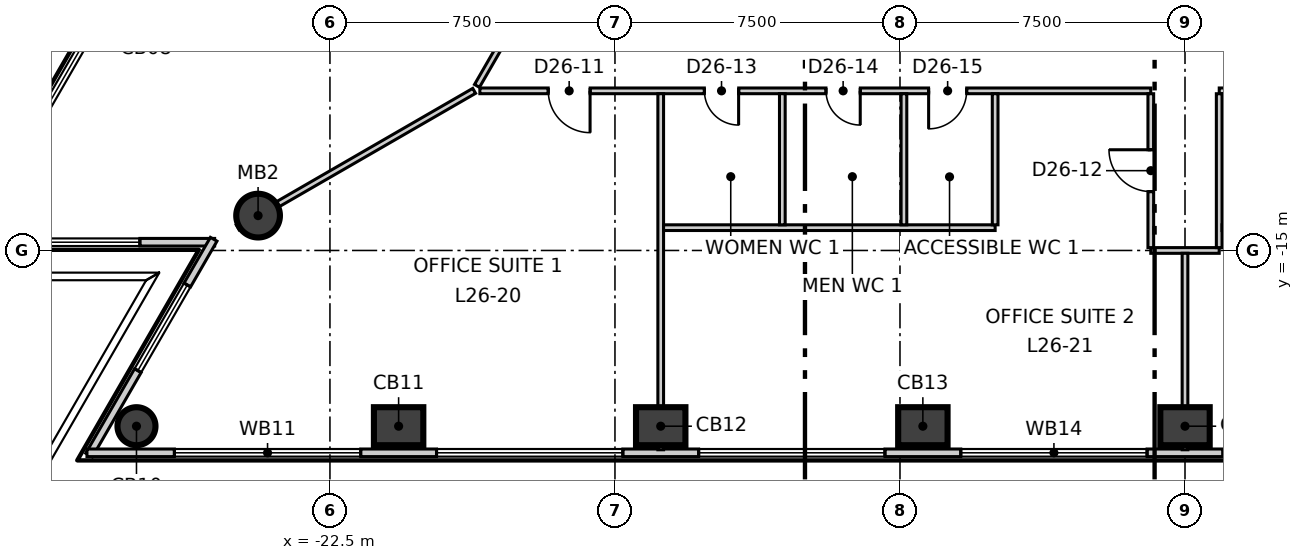
"""IFC4 building model, lengths in metres.
Left out: names, types, materials, properties, quantities, classifications, styles, units other than length and angle.
Written with IfcOpenShell. Run it as: python <this file> out.ifc"""

import sys

from ifc_helpers import new_model, si_unit, direction, frame, frame_2d, origin, origin_2d, place, context, subcontext, project, spatial, rectangle, circle, extrude, element, fill, save


model = new_model("IFC4")
c1 = context("Model", 3, precision=1e-05, world=origin(), true_north=direction((0.0, 1.0)))
c2 = subcontext(c1, "Body", "Model", "MODEL_VIEW")
j1 = project(units=[si_unit("LENGTHUNIT", "METRE"), si_unit("PLANEANGLEUNIT", "RADIAN")], contexts=[c1])
p1 = place(None, origin())
s1 = spatial("IfcSite", under=j1, at=p1, CompositionType="ELEMENT")
p2 = place(p1, origin())
s2 = spatial("IfcBuilding", under=s1, at=p2, CompositionType="ELEMENT")
p3 = place(p2, frame((0.0, 0.0, 116.3)))
s3 = spatial("IfcBuildingStorey", under=s2, at=p3, CompositionType="ELEMENT", Elevation=116.3)
p4 = place(p3, frame((-27.591, -19.624, -0.3), z_axis=(0.0, 0.0, 1.0), x_axis=(1.0, 0.0, 0.0)))
e1 = element("IfcColumn", 1, at=p4, inside=s3, PredefinedType="COLUMN", context=c2, shape_type="SweptSolid", body=[
    extrude(circle(Radius=0.5, at=origin_2d()), origin(), (0.0, 0.0, 1.0), 4.0),
])
for number, where, z_axis, x_axis in (
    (2, (-20.693, -19.624, -0.3), (0.0, 0.0, 1.0), (1.0, 0.0, 0.0)),
    (3, (-13.796, -19.624, -0.3), (0.0, 0.0, 1.0), (1.0, 0.0, 0.0)),
    (4, (-6.898, -19.624, -0.3), (0.0, 0.0, 1.0), (1.0, 0.0, 0.0)),
    (5, (0.0, -19.624, -0.3), (0.0, 0.0, 1.0), (1.0, 0.0, 0.0)),
):
    element("IfcColumn", number, at=place(p3, frame(where, z_axis=z_axis, x_axis=x_axis)), inside=s3, PredefinedType="COLUMN", context=c2, shape_type="SweptSolid", body=[
        extrude(rectangle(XDim=1.3, YDim=1.0, at=origin_2d()), origin(), (0.0, 0.0, 1.0), 4.0),
    ])
p5 = place(p3, frame((-24.391, -14.083, -0.3), z_axis=(0.0, 0.0, 1.0), x_axis=(1.0, 0.0, 0.0)))
e6 = element("IfcColumn", 6, at=p5, inside=s3, PredefinedType="COLUMN", context=c2, shape_type="SweptSolid", body=[
    extrude(circle(Radius=0.575, at=origin_2d()), origin(), (0.0, 0.0, 1.0), 4.0),
])
p6 = place(p3, frame((-3.154, 35.185, 0.0), z_axis=(0.0, 0.0, 1.0), x_axis=(-0.499996704161, -0.866027306629, 0.0)))
e7 = element("IfcWall", 7, at=p6, inside=s3, PredefinedType="ELEMENTEDWALL", context=c2, shape_type="SweptSolid", body=[
    extrude(rectangle(XDim=57.769, YDim=0.2, at=frame_2d((28.884, 0.0))), origin(), (0.0, 0.0, 1.0), 3.7),
])
p7 = place(p6, frame((2.301, 0.0, 0.9)))
e8 = element("IfcOpeningElement", 8, at=p7, cuts=e7, PredefinedType="OPENING", context=c2, shape_type="SweptSolid", body=[
    extrude(rectangle(XDim=4.9, YDim=2.5, at=frame_2d((2.45, 1.25))), frame((0.0, 0.11, 0.0), z_axis=(0.0, -1.0, 0.0), x_axis=(1.0, 0.0, 0.0)), (0.0, 0.0, 1.0), 0.22),
])
p8 = place(p6, frame((9.199, 0.0, 0.9)))
e9 = element("IfcOpeningElement", 9, at=p8, cuts=e7, PredefinedType="OPENING", context=c2, shape_type="SweptSolid", body=[
    extrude(rectangle(XDim=4.9, YDim=2.5, at=frame_2d((2.45, 1.25))), frame((0.0, 0.11, 0.0), z_axis=(0.0, -1.0, 0.0), x_axis=(1.0, 0.0, 0.0)), (0.0, 0.0, 1.0), 0.22),
])
p9 = place(p6, frame((16.097, 0.0, 0.9)))
e10 = element("IfcOpeningElement", 10, at=p9, cuts=e7, PredefinedType="OPENING", context=c2, shape_type="SweptSolid", body=[
    extrude(rectangle(XDim=4.9, YDim=2.5, at=frame_2d((2.45, 1.25))), frame((0.0, 0.11, 0.0), z_axis=(0.0, -1.0, 0.0), x_axis=(1.0, 0.0, 0.0)), (0.0, 0.0, 1.0), 0.22),
])
p10 = place(p6, frame((22.995, 0.0, 0.9)))
e11 = element("IfcOpeningElement", 11, at=p10, cuts=e7, PredefinedType="OPENING", context=c2, shape_type="SweptSolid", body=[
    extrude(rectangle(XDim=4.9, YDim=2.5, at=frame_2d((2.45, 1.25))), frame((0.0, 0.11, 0.0), z_axis=(0.0, -1.0, 0.0), x_axis=(1.0, 0.0, 0.0)), (0.0, 0.0, 1.0), 0.22),
])
p11 = place(p6, frame((29.893, 0.0, 0.9)))
e12 = element("IfcOpeningElement", 12, at=p11, cuts=e7, PredefinedType="OPENING", context=c2, shape_type="SweptSolid", body=[
    extrude(rectangle(XDim=4.9, YDim=2.5, at=frame_2d((2.45, 1.25))), frame((0.0, 0.11, 0.0), z_axis=(0.0, -1.0, 0.0), x_axis=(1.0, 0.0, 0.0)), (0.0, 0.0, 1.0), 0.22),
])
p12 = place(p6, frame((36.791, 0.0, 0.9)))
e13 = element("IfcOpeningElement", 13, at=p12, cuts=e7, PredefinedType="OPENING", context=c2, shape_type="SweptSolid", body=[
    extrude(rectangle(XDim=4.9, YDim=2.5, at=frame_2d((2.45, 1.25))), frame((0.0, 0.11, 0.0), z_axis=(0.0, -1.0, 0.0), x_axis=(1.0, 0.0, 0.0)), (0.0, 0.0, 1.0), 0.22),
])
p13 = place(p6, frame((43.689, 0.0, 0.9)))
e14 = element("IfcOpeningElement", 14, at=p13, cuts=e7, PredefinedType="OPENING", context=c2, shape_type="SweptSolid", body=[
    extrude(rectangle(XDim=4.9, YDim=2.5, at=frame_2d((2.45, 1.25))), frame((0.0, 0.11, 0.0), z_axis=(0.0, -1.0, 0.0), x_axis=(1.0, 0.0, 0.0)), (0.0, 0.0, 1.0), 0.22),
])
p14 = place(p6, frame((50.586, 0.0, 0.9)))
e15 = element("IfcOpeningElement", 15, at=p14, cuts=e7, PredefinedType="OPENING", context=c2, shape_type="SweptSolid", body=[
    extrude(rectangle(XDim=4.9, YDim=2.5, at=frame_2d((2.45, 1.25))), frame((0.0, 0.11, 0.0), z_axis=(0.0, -1.0, 0.0), x_axis=(1.0, 0.0, 0.0)), (0.0, 0.0, 1.0), 0.22),
])
p15 = place(p3, frame((-32.093, -14.783, 0.0), z_axis=(0.0, 0.0, 1.0), x_axis=(1.0, 0.0, 0.0)))
e16 = element("IfcWall", 16, at=p15, inside=s3, PredefinedType="ELEMENTEDWALL", context=c2, shape_type="SweptSolid", body=[
    extrude(rectangle(XDim=6.559, YDim=0.2, at=frame_2d((3.28, 0.0))), origin(), (0.0, 0.0, 1.0), 3.7),
])
p16 = place(p15, frame((1.99, 0.0, 0.9)))
e17 = element("IfcOpeningElement", 17, at=p16, cuts=e16, PredefinedType="OPENING", context=c2, shape_type="SweptSolid", body=[
    extrude(rectangle(XDim=2.6, YDim=2.5, at=frame_2d((1.3, 1.25))), frame((0.0, 0.11, 0.0), z_axis=(0.0, -1.0, 0.0), x_axis=(1.0, 0.0, 0.0)), (0.0, 0.0, 1.0), 0.22),
])
p17 = place(p3, frame((-25.559, -14.705, 0.0), z_axis=(0.0, 0.0, 1.0), x_axis=(-0.500082240168, -0.865977917195, 0.0)))
e18 = element("IfcWall", 18, at=p17, inside=s3, PredefinedType="ELEMENTEDWALL", context=c2, shape_type="SweptSolid", body=[
    extrude(rectangle(XDim=6.559, YDim=0.2, at=frame_2d((3.28, 0.0))), origin(), (0.0, 0.0, 1.0), 3.7),
])
p18 = place(p17, frame((1.39, 0.0, 0.9)))
e19 = element("IfcOpeningElement", 19, at=p18, cuts=e18, PredefinedType="OPENING", context=c2, shape_type="SweptSolid", body=[
    extrude(rectangle(XDim=2.6, YDim=2.5, at=frame_2d((1.3, 1.25))), frame((0.0, 0.11, 0.0), z_axis=(0.0, -1.0, 0.0), x_axis=(1.0, 0.0, 0.0)), (0.0, 0.0, 1.0), 0.22),
])
p19 = place(p3, frame((-28.894, -20.324, 0.0), z_axis=(0.0, 0.0, 1.0), x_axis=(1.0, 0.0, 0.0)))
e20 = element("IfcWall", 20, at=p19, inside=s3, PredefinedType="ELEMENTEDWALL", context=c2, shape_type="SweptSolid", body=[
    extrude(rectangle(XDim=57.768, YDim=0.2, at=frame_2d((28.884, 0.0))), origin(), (0.0, 0.0, 1.0), 3.7),
])
p20 = place(p19, frame((2.302, 0.0, 0.9)))
e21 = element("IfcOpeningElement", 21, at=p20, cuts=e20, PredefinedType="OPENING", context=c2, shape_type="SweptSolid", body=[
    extrude(rectangle(XDim=4.9, YDim=2.5, at=frame_2d((2.45, 1.25))), frame((0.0, 0.11, 0.0), z_axis=(0.0, -1.0, 0.0), x_axis=(1.0, 0.0, 0.0)), (0.0, 0.0, 1.0), 0.22),
])
p21 = place(p19, frame((9.2, 0.0, 0.9)))
e22 = element("IfcOpeningElement", 22, at=p21, cuts=e20, PredefinedType="OPENING", context=c2, shape_type="SweptSolid", body=[
    extrude(rectangle(XDim=4.9, YDim=2.5, at=frame_2d((2.45, 1.25))), frame((0.0, 0.11, 0.0), z_axis=(0.0, -1.0, 0.0), x_axis=(1.0, 0.0, 0.0)), (0.0, 0.0, 1.0), 0.22),
])
p22 = place(p19, frame((16.097, 0.0, 0.9)))
e23 = element("IfcOpeningElement", 23, at=p22, cuts=e20, PredefinedType="OPENING", context=c2, shape_type="SweptSolid", body=[
    extrude(rectangle(XDim=4.9, YDim=2.5, at=frame_2d((2.45, 1.25))), frame((0.0, 0.11, 0.0), z_axis=(0.0, -1.0, 0.0), x_axis=(1.0, 0.0, 0.0)), (0.0, 0.0, 1.0), 0.22),
])
p23 = place(p19, frame((22.995, 0.0, 0.9)))
e24 = element("IfcOpeningElement", 24, at=p23, cuts=e20, PredefinedType="OPENING", context=c2, shape_type="SweptSolid", body=[
    extrude(rectangle(XDim=4.9, YDim=2.5, at=frame_2d((2.45, 1.25))), frame((0.0, 0.11, 0.0), z_axis=(0.0, -1.0, 0.0), x_axis=(1.0, 0.0, 0.0)), (0.0, 0.0, 1.0), 0.22),
])
p24 = place(p19, frame((29.893, 0.0, 0.9)))
e25 = element("IfcOpeningElement", 25, at=p24, cuts=e20, PredefinedType="OPENING", context=c2, shape_type="SweptSolid", body=[
    extrude(rectangle(XDim=4.9, YDim=2.5, at=frame_2d((2.45, 1.25))), frame((0.0, 0.11, 0.0), z_axis=(0.0, -1.0, 0.0), x_axis=(1.0, 0.0, 0.0)), (0.0, 0.0, 1.0), 0.22),
])
p25 = place(p19, frame((36.791, 0.0, 0.9)))
e26 = element("IfcOpeningElement", 26, at=p25, cuts=e20, PredefinedType="OPENING", context=c2, shape_type="SweptSolid", body=[
    extrude(rectangle(XDim=4.9, YDim=2.5, at=frame_2d((2.45, 1.25))), frame((0.0, 0.11, 0.0), z_axis=(0.0, -1.0, 0.0), x_axis=(1.0, 0.0, 0.0)), (0.0, 0.0, 1.0), 0.22),
])
p26 = place(p19, frame((43.688, 0.0, 0.9)))
e27 = element("IfcOpeningElement", 27, at=p26, cuts=e20, PredefinedType="OPENING", context=c2, shape_type="SweptSolid", body=[
    extrude(rectangle(XDim=4.9, YDim=2.5, at=frame_2d((2.45, 1.25))), frame((0.0, 0.11, 0.0), z_axis=(0.0, -1.0, 0.0), x_axis=(1.0, 0.0, 0.0)), (0.0, 0.0, 1.0), 0.22),
])
p27 = place(p19, frame((50.586, 0.0, 0.9)))
e28 = element("IfcOpeningElement", 28, at=p27, cuts=e20, PredefinedType="OPENING", context=c2, shape_type="SweptSolid", body=[
    extrude(rectangle(XDim=4.9, YDim=2.5, at=frame_2d((2.45, 1.25))), frame((0.0, 0.11, 0.0), z_axis=(0.0, -1.0, 0.0), x_axis=(1.0, 0.0, 0.0)), (0.0, 0.0, 1.0), 0.22),
])
p28 = place(p3, frame((-24.928, -14.393, 0.0), z_axis=(0.0, 0.0, 1.0), x_axis=(0.866011883308, 0.500023417421, 0.0)))
e29 = element("IfcWall", 29, at=p28, inside=s3, PredefinedType="PARTITIONING", context=c2, shape_type="SweptSolid", body=[
    extrude(rectangle(XDim=7.186, YDim=0.15, at=frame_2d((3.593, 0.0))), origin(), (0.0, 0.0, 1.0), 3.15),
])
p29 = place(p3, frame((-18.555, -10.8, 0.0), z_axis=(0.0, 0.0, 1.0), x_axis=(1.0, 0.0, 0.0)))
e30 = element("IfcWall", 30, at=p29, inside=s3, PredefinedType="PARTITIONING", context=c2, shape_type="SweptSolid", body=[
    extrude(rectangle(XDim=17.654, YDim=0.15, at=frame_2d((8.827, 0.0))), origin(), (0.0, 0.0, 1.0), 3.7),
])
p30 = place(p29, frame((1.8, 0.0, 0.0)))
e31 = element("IfcOpeningElement", 31, at=p30, cuts=e30, PredefinedType="OPENING", context=c2, shape_type="SweptSolid", body=[
    extrude(rectangle(XDim=1.1, YDim=2.1, at=frame_2d((0.55, 1.05))), frame((0.0, 0.085, 0.0), z_axis=(0.0, -1.0, 0.0), x_axis=(1.0, 0.0, 0.0)), (0.0, 0.0, 1.0), 0.17),
])
p31 = place(p29, frame((5.909, 0.0, 0.0)))
e32 = element("IfcOpeningElement", 32, at=p31, cuts=e30, PredefinedType="OPENING", context=c2, shape_type="SweptSolid", body=[
    extrude(rectangle(XDim=0.9, YDim=2.1, at=frame_2d((0.45, 1.05))), frame((0.0, 0.085, 0.0), z_axis=(0.0, -1.0, 0.0), x_axis=(1.0, 0.0, 0.0)), (0.0, 0.0, 1.0), 0.17),
])
p32 = place(p29, frame((9.109, 0.0, 0.0)))
e33 = element("IfcOpeningElement", 33, at=p32, cuts=e30, PredefinedType="OPENING", context=c2, shape_type="SweptSolid", body=[
    extrude(rectangle(XDim=0.9, YDim=2.1, at=frame_2d((0.45, 1.05))), frame((0.0, 0.085, 0.0), z_axis=(0.0, -1.0, 0.0), x_axis=(1.0, 0.0, 0.0)), (0.0, 0.0, 1.0), 0.17),
])
p33 = place(p29, frame((11.809, 0.0, 0.0)))
e34 = element("IfcOpeningElement", 34, at=p33, cuts=e30, PredefinedType="OPENING", context=c2, shape_type="SweptSolid", body=[
    extrude(rectangle(XDim=1.0, YDim=2.1, at=frame_2d((0.5, 1.05))), frame((0.0, 0.085, 0.0), z_axis=(0.0, -1.0, 0.0), x_axis=(1.0, 0.0, 0.0)), (0.0, 0.0, 1.0), 0.17),
])
p34 = place(p3, frame((0.901, -10.8, 0.0), z_axis=(0.0, 0.0, 1.0), x_axis=(1.0, 0.0, 0.0)))
e35 = element("IfcWall", 35, at=p34, inside=s3, PredefinedType="PARTITIONING", context=c2, shape_type="SweptSolid", body=[
    extrude(rectangle(XDim=17.804, YDim=0.15, at=frame_2d((8.902, 0.0))), origin(), (0.0, 0.0, 1.0), 3.7),
])
p35 = place(p34, frame((5.849, 0.0, 0.0)))
e36 = element("IfcOpeningElement", 36, at=p35, cuts=e35, PredefinedType="OPENING", context=c2, shape_type="SweptSolid", body=[
    extrude(rectangle(XDim=1.1, YDim=2.1, at=frame_2d((0.55, 1.05))), frame((0.0, 0.085, 0.0), z_axis=(0.0, -1.0, 0.0), x_axis=(1.0, 0.0, 0.0)), (0.0, 0.0, 1.0), 0.17),
])
p36 = place(p34, frame((14.844, 0.0, 0.0)))
e37 = element("IfcOpeningElement", 37, at=p36, cuts=e35, PredefinedType="OPENING", context=c2, shape_type="SweptSolid", body=[
    extrude(rectangle(XDim=1.1, YDim=2.1, at=frame_2d((0.55, 1.05))), frame((0.0, 0.085, 0.0), z_axis=(0.0, -1.0, 0.0), x_axis=(1.0, 0.0, 0.0)), (0.0, 0.0, 1.0), 0.17),
])
p37 = place(p3, frame((-18.631, -10.67, 0.0), z_axis=(0.0, 0.0, 1.0), x_axis=(0.499981532133, 0.86603606595, 0.0)))
e38 = element("IfcWall", 38, at=p37, inside=s3, PredefinedType="PARTITIONING", context=c2, shape_type="SweptSolid", body=[
    extrude(rectangle(XDim=24.553, YDim=0.15, at=frame_2d((12.277, 0.0))), origin(), (0.0, 0.0, 1.0), 3.7),
])
p38 = place(p37, frame((11.604, 0.0, 0.0)))
e39 = element("IfcOpeningElement", 39, at=p38, cuts=e38, PredefinedType="OPENING", context=c2, shape_type="SweptSolid", body=[
    extrude(rectangle(XDim=1.1, YDim=2.1, at=frame_2d((0.55, 1.05))), frame((0.0, 0.085, 0.0), z_axis=(0.0, -1.0, 0.0), x_axis=(1.0, 0.0, 0.0)), (0.0, 0.0, 1.0), 0.17),
])
p39 = place(p3, frame((-13.796, -20.244, 0.0), z_axis=(0.0, 0.0, 1.0), x_axis=(0.0, 1.0, 0.0)))
e40 = element("IfcWall", 40, at=p39, inside=s3, PredefinedType="PARTITIONING", context=c2, shape_type="SweptSolid", body=[
    extrude(rectangle(XDim=9.369, YDim=0.15, at=frame_2d((4.685, 0.0))), origin(), (0.0, 0.0, 1.0), 3.7),
])
p40 = place(p3, frame((-13.721, -14.4, 0.0), z_axis=(0.0, 0.0, 1.0), x_axis=(1.0, 0.0, 0.0)))
e41 = element("IfcWall", 41, at=p40, inside=s3, PredefinedType="PARTITIONING", context=c2, shape_type="SweptSolid", body=[
    extrude(rectangle(XDim=8.725, YDim=0.15, at=frame_2d((4.362, 0.0))), origin(), (0.0, 0.0, 1.0), 3.7),
])
for number, where, z_axis, x_axis in (
    (42, (-10.596, -14.325, 0.0), (0.0, 0.0, 1.0), (0.0, 1.0, 0.0)),
    (43, (-4.996, -14.325, 0.0), (0.0, 0.0, 1.0), (0.0, 1.0, 0.0)),
    (44, (-7.396, -14.325, 0.0), (0.0, 0.0, 1.0), (0.0, 1.0, 0.0)),
):
    element("IfcWall", number, at=place(p3, frame(where, z_axis=z_axis, x_axis=x_axis)), inside=s3, PredefinedType="PARTITIONING", context=c2, shape_type="SweptSolid", body=[
        extrude(rectangle(XDim=3.45, YDim=0.15, at=frame_2d((1.725, 0.0))), origin(), (0.0, 0.0, 1.0), 3.7),
    ])
p41 = place(p3, frame((-0.9, -15.0, 0.0), z_axis=(0.0, 0.0, 1.0), x_axis=(1.0, 0.0, 0.0)))
e45 = element("IfcWall", 45, at=p41, inside=s3, PredefinedType="PARTITIONING", context=c2, shape_type="SweptSolid", body=[
    extrude(rectangle(XDim=1.8, YDim=0.15, at=frame_2d((0.9, 0.0))), origin(), (0.0, 0.0, 1.0), 3.7),
])
p42 = place(p3, frame((-0.9, -14.925, 0.0), z_axis=(0.0, 0.0, 1.0), x_axis=(0.0, 1.0, 0.0)))
e46 = element("IfcWall", 46, at=p42, inside=s3, PredefinedType="PARTITIONING", context=c2, shape_type="SweptSolid", body=[
    extrude(rectangle(XDim=4.049, YDim=0.15, at=frame_2d((2.024, 0.0))), origin(), (0.0, 0.0, 1.0), 3.7),
])
p43 = place(p42, frame((1.475, 0.0, 0.0)))
e47 = element("IfcOpeningElement", 47, at=p43, cuts=e46, PredefinedType="OPENING", context=c2, shape_type="SweptSolid", body=[
    extrude(rectangle(XDim=1.1, YDim=2.1, at=frame_2d((0.55, 1.05))), frame((0.0, 0.085, 0.0), z_axis=(0.0, -1.0, 0.0), x_axis=(1.0, 0.0, 0.0)), (0.0, 0.0, 1.0), 0.17),
])
p44 = place(p3, frame((0.0, -20.244, 0.0), z_axis=(0.0, 0.0, 1.0), x_axis=(0.0, 1.0, 0.0)))
e48 = element("IfcWall", 48, at=p44, inside=s3, PredefinedType="PARTITIONING", context=c2, shape_type="SweptSolid", body=[
    extrude(rectangle(XDim=5.169, YDim=0.15, at=frame_2d((2.584, 0.0))), origin(), (0.0, 0.0, 1.0), 3.2),
])
p45 = place(p3, frame((0.9, -14.925, 0.0), z_axis=(0.0, 0.0, 1.0), x_axis=(0.0, 1.0, 0.0)))
e49 = element("IfcWall", 49, at=p45, inside=s3, PredefinedType="PARTITIONING", context=c2, shape_type="SweptSolid", body=[
    extrude(rectangle(XDim=4.049, YDim=0.15, at=frame_2d((2.024, 0.0))), origin(), (0.0, 0.0, 1.0), 3.7),
])
p46 = place(p3, frame((0.975, -14.4, 0.0), z_axis=(0.0, 0.0, 1.0), x_axis=(1.0, 0.0, 0.0)))
e50 = element("IfcWall", 50, at=p46, inside=s3, PredefinedType="PARTITIONING", context=c2, shape_type="SweptSolid", body=[
    extrude(rectangle(XDim=12.745, YDim=0.15, at=frame_2d((6.373, 0.0))), origin(), (0.0, 0.0, 1.0), 3.7),
])
p47 = place(p46, frame((5.875, 0.0, 0.0)))
e51 = element("IfcOpeningElement", 51, at=p47, cuts=e50, PredefinedType="OPENING", context=c2, shape_type="SweptSolid", body=[
    extrude(rectangle(XDim=1.0, YDim=2.1, at=frame_2d((0.5, 1.05))), frame((0.0, 0.085, 0.0), z_axis=(0.0, -1.0, 0.0), x_axis=(1.0, 0.0, 0.0)), (0.0, 0.0, 1.0), 0.17),
])
p48 = place(p14, origin())
e52 = element("IfcWindow", 52, at=p48, inside=s3, PartitioningType="SINGLE_PANEL", PredefinedType="WINDOW", context=c2, shape_type="SweptSolid", body=[
    extrude(rectangle(XDim=4.9, YDim=2.5, at=frame_2d((2.45, 1.25))), frame((0.0, 0.03, 0.0), z_axis=(0.0, -1.0, 0.0), x_axis=(1.0, 0.0, 0.0)), (0.0, 0.0, 1.0), 0.06),
])
fill(e15, e52)
p49 = place(p16, origin())
e53 = element("IfcWindow", 53, at=p49, inside=s3, PartitioningType="SINGLE_PANEL", PredefinedType="WINDOW", context=c2, shape_type="SweptSolid", body=[
    extrude(rectangle(XDim=2.6, YDim=2.5, at=frame_2d((1.3, 1.25))), frame((0.0, 0.03, 0.0), z_axis=(0.0, -1.0, 0.0), x_axis=(1.0, 0.0, 0.0)), (0.0, 0.0, 1.0), 0.06),
])
fill(e17, e53)
p50 = place(p18, origin())
e54 = element("IfcWindow", 54, at=p50, inside=s3, PartitioningType="SINGLE_PANEL", PredefinedType="WINDOW", context=c2, shape_type="SweptSolid", body=[
    extrude(rectangle(XDim=2.6, YDim=2.5, at=frame_2d((1.3, 1.25))), frame((0.0, 0.03, 0.0), z_axis=(0.0, -1.0, 0.0), x_axis=(1.0, 0.0, 0.0)), (0.0, 0.0, 1.0), 0.06),
])
fill(e19, e54)
p51 = place(p20, origin())
e55 = element("IfcWindow", 55, at=p51, inside=s3, PartitioningType="SINGLE_PANEL", PredefinedType="WINDOW", context=c2, shape_type="SweptSolid", body=[
    extrude(rectangle(XDim=4.9, YDim=2.5, at=frame_2d((2.45, 1.25))), frame((0.0, 0.03, 0.0), z_axis=(0.0, -1.0, 0.0), x_axis=(1.0, 0.0, 0.0)), (0.0, 0.0, 1.0), 0.06),
])
fill(e21, e55)
p52 = place(p21, origin())
e56 = element("IfcWindow", 56, at=p52, inside=s3, PartitioningType="SINGLE_PANEL", PredefinedType="WINDOW", context=c2, shape_type="SweptSolid", body=[
    extrude(rectangle(XDim=4.9, YDim=2.5, at=frame_2d((2.45, 1.25))), frame((0.0, 0.03, 0.0), z_axis=(0.0, -1.0, 0.0), x_axis=(1.0, 0.0, 0.0)), (0.0, 0.0, 1.0), 0.06),
])
fill(e22, e56)
p53 = place(p22, origin())
e57 = element("IfcWindow", 57, at=p53, inside=s3, PartitioningType="SINGLE_PANEL", PredefinedType="WINDOW", context=c2, shape_type="SweptSolid", body=[
    extrude(rectangle(XDim=4.9, YDim=2.5, at=frame_2d((2.45, 1.25))), frame((0.0, 0.03, 0.0), z_axis=(0.0, -1.0, 0.0), x_axis=(1.0, 0.0, 0.0)), (0.0, 0.0, 1.0), 0.06),
])
fill(e23, e57)
p54 = place(p23, origin())
e58 = element("IfcWindow", 58, at=p54, inside=s3, PartitioningType="SINGLE_PANEL", PredefinedType="WINDOW", context=c2, shape_type="SweptSolid", body=[
    extrude(rectangle(XDim=4.9, YDim=2.5, at=frame_2d((2.45, 1.25))), frame((0.0, 0.03, 0.0), z_axis=(0.0, -1.0, 0.0), x_axis=(1.0, 0.0, 0.0)), (0.0, 0.0, 1.0), 0.06),
])
fill(e24, e58)
p55 = place(p24, origin())
e59 = element("IfcWindow", 59, at=p55, inside=s3, PartitioningType="SINGLE_PANEL", PredefinedType="WINDOW", context=c2, shape_type="SweptSolid", body=[
    extrude(rectangle(XDim=4.9, YDim=2.5, at=frame_2d((2.45, 1.25))), frame((0.0, 0.03, 0.0), z_axis=(0.0, -1.0, 0.0), x_axis=(1.0, 0.0, 0.0)), (0.0, 0.0, 1.0), 0.06),
])
fill(e25, e59)
p56 = place(p30, origin())
e60 = element("IfcDoor", 60, at=p56, inside=s3, OperationType="SINGLE_SWING_RIGHT", PredefinedType="DOOR", context=c2, shape_type="SweptSolid", body=[
    extrude(rectangle(XDim=1.1, YDim=2.1, at=frame_2d((0.55, 1.05))), frame((0.0, 0.025, 0.0), z_axis=(0.0, -1.0, 0.0), x_axis=(1.0, 0.0, 0.0)), (0.0, 0.0, 1.0), 0.05),
])
fill(e31, e60)
p57 = place(p43, origin())
e61 = element("IfcDoor", 61, at=p57, inside=s3, OperationType="SINGLE_SWING_LEFT", PredefinedType="DOOR", context=c2, shape_type="SweptSolid", body=[
    extrude(rectangle(XDim=1.1, YDim=2.1, at=frame_2d((0.55, 1.05))), frame((0.0, 0.025, 0.0), z_axis=(0.0, -1.0, 0.0), x_axis=(1.0, 0.0, 0.0)), (0.0, 0.0, 1.0), 0.05),
])
fill(e47, e61)
p58 = place(p31, origin())
e62 = element("IfcDoor", 62, at=p58, inside=s3, OperationType="SINGLE_SWING_RIGHT", PredefinedType="DOOR", context=c2, shape_type="SweptSolid", body=[
    extrude(rectangle(XDim=0.9, YDim=2.1, at=frame_2d((0.45, 1.05))), frame((0.0, 0.025, 0.0), z_axis=(0.0, -1.0, 0.0), x_axis=(1.0, 0.0, 0.0)), (0.0, 0.0, 1.0), 0.05),
])
fill(e32, e62)
p59 = place(p32, origin())
e63 = element("IfcDoor", 63, at=p59, inside=s3, OperationType="SINGLE_SWING_RIGHT", PredefinedType="DOOR", context=c2, shape_type="SweptSolid", body=[
    extrude(rectangle(XDim=0.9, YDim=2.1, at=frame_2d((0.45, 1.05))), frame((0.0, 0.025, 0.0), z_axis=(0.0, -1.0, 0.0), x_axis=(1.0, 0.0, 0.0)), (0.0, 0.0, 1.0), 0.05),
])
fill(e33, e63)
p60 = place(p33, origin())
e64 = element("IfcDoor", 64, at=p60, inside=s3, OperationType="SINGLE_SWING_LEFT", PredefinedType="DOOR", context=c2, shape_type="SweptSolid", body=[
    extrude(rectangle(XDim=1.0, YDim=2.1, at=frame_2d((0.5, 1.05))), frame((0.0, 0.025, 0.0), z_axis=(0.0, -1.0, 0.0), x_axis=(1.0, 0.0, 0.0)), (0.0, 0.0, 1.0), 0.05),
])
fill(e34, e64)
save(model, sys.argv[1])
